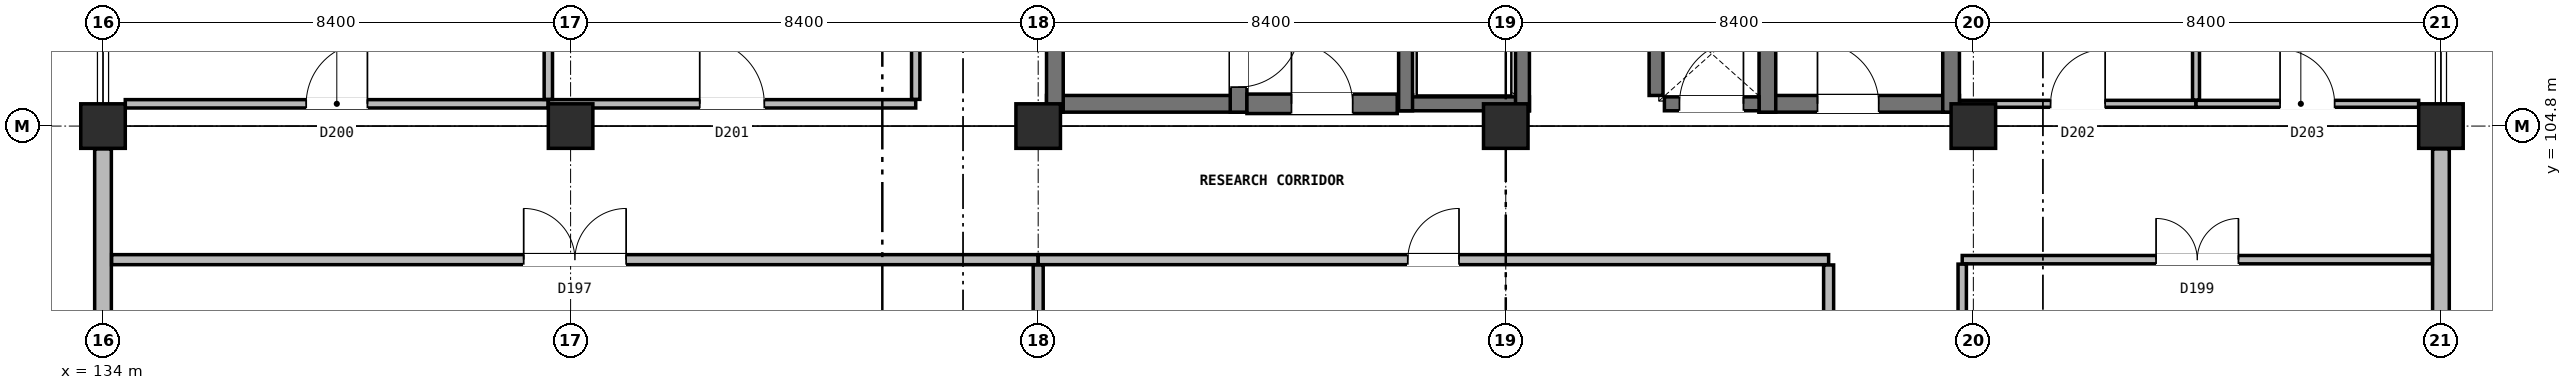
"""IFC4 building model, lengths in metres.
Left out: names, types, materials, properties, quantities, classifications, styles, units other than length and angle.
Written with IfcOpenShell. Run it as: python <this file> out.ifc"""

import sys

from ifc_helpers import new_model, si_unit, direction, frame, frame_2d, origin, origin_2d, place, context, subcontext, project, spatial, rectangle, extrude, element, fill, save


model = new_model("IFC4")
c1 = context("Model", 3, precision=1e-05, world=origin(), true_north=direction((0.0, 1.0)))
c2 = subcontext(c1, "Body", "Model", "MODEL_VIEW")
j1 = project(units=[si_unit("LENGTHUNIT", "METRE"), si_unit("PLANEANGLEUNIT", "RADIAN")], contexts=[c1])
p1 = place(None, origin())
s1 = spatial("IfcSite", under=j1, at=p1, CompositionType="ELEMENT")
p2 = place(p1, origin())
s2 = spatial("IfcBuilding", under=s1, at=p2, CompositionType="ELEMENT")
p3 = place(p2, frame((0.0, 0.0, 17.2)))
s3 = spatial("IfcBuildingStorey", under=s2, at=p3, CompositionType="ELEMENT", Elevation=17.2)
for number, where, z_axis, x_axis in (
    (1, (134.0, 104.8, 0.0), (0.0, 0.0, 1.0), (1.0, 0.0, 0.0)),
    (2, (142.4, 104.8, 0.0), (0.0, 0.0, 1.0), (1.0, 0.0, 0.0)),
    (3, (150.8, 104.8, 0.0), (0.0, 0.0, 1.0), (1.0, 0.0, 0.0)),
    (4, (159.2, 104.8, 0.0), (0.0, 0.0, 1.0), (1.0, 0.0, 0.0)),
    (5, (167.6, 104.8, 0.0), (0.0, 0.0, 1.0), (1.0, 0.0, 0.0)),
    (6, (176.0, 104.8, 0.0), (0.0, 0.0, 1.0), (1.0, 0.0, 0.0)),
):
    element("IfcColumn", number, at=place(p3, frame(where, z_axis=z_axis, x_axis=x_axis)), inside=s3, PredefinedType="COLUMN", context=c2, shape_type="SweptSolid", body=[
        extrude(rectangle(XDim=0.8, YDim=0.8, at=origin_2d()), origin(), (0.0, 0.0, 1.0), 3.8),
    ])
p4 = place(p3, frame((176.0, 96.41, 0.0), z_axis=(0.0, 0.0, 1.0), x_axis=(0.0, 1.0, 0.0)))
e7 = element("IfcWall", 7, at=p4, inside=s3, PredefinedType="SOLIDWALL", context=c2, shape_type="SweptSolid", body=[
    extrude(rectangle(XDim=7.98, YDim=0.3, at=frame_2d((3.99, 0.0))), origin(), (0.0, 0.0, 1.0), 3.05),
])
p5 = place(p4, frame((1.695, 0.0, 0.9)))
e8 = element("IfcOpeningElement", 8, at=p5, cuts=e7, PredefinedType="OPENING", context=c2, shape_type="SweptSolid", body=[
    extrude(rectangle(XDim=2.6, YDim=2.0, at=frame_2d((1.3, 1.0))), frame((0.0, 0.16, 0.0), z_axis=(0.0, -1.0, 0.0), x_axis=(1.0, 0.0, 0.0)), (0.0, 0.0, 1.0), 0.32),
])
p6 = place(p3, frame((134.0, 104.39, 0.0), z_axis=(0.0, 0.0, 1.0), x_axis=(0.0, -1.0, 0.0)))
e9 = element("IfcWall", 9, at=p6, inside=s3, PredefinedType="SOLIDWALL", context=c2, shape_type="SweptSolid", body=[
    extrude(rectangle(XDim=7.98, YDim=0.3, at=frame_2d((3.99, 0.0))), origin(), (0.0, 0.0, 1.0), 3.05),
])
p7 = place(p6, frame((3.685, 0.0, 0.9)))
e10 = element("IfcOpeningElement", 10, at=p7, cuts=e9, PredefinedType="OPENING", context=c2, shape_type="SweptSolid", body=[
    extrude(rectangle(XDim=2.6, YDim=2.0, at=frame_2d((1.3, 1.0))), frame((0.0, 0.16, 0.0), z_axis=(0.0, -1.0, 0.0), x_axis=(1.0, 0.0, 0.0)), (0.0, 0.0, 1.0), 0.32),
])
p8 = place(p3, frame((150.95, 105.2, 0.0), z_axis=(0.0, 0.0, 1.0), x_axis=(1.0, 0.0, 0.0)))
e11 = element("IfcWall", 11, at=p8, inside=s3, PredefinedType="SHEAR", context=c2, shape_type="SweptSolid", body=[
    extrude(rectangle(XDim=3.6, YDim=0.3, at=frame_2d((1.8, 0.0))), origin(), (0.0, 0.0, 1.0), 3.8),
])
p9 = place(p3, frame((151.1, 105.05, 0.0), z_axis=(0.0, 0.0, 1.0), x_axis=(0.0, 1.0, 0.0)))
e12 = element("IfcWall", 12, at=p9, inside=s3, PredefinedType="SHEAR", context=c2, shape_type="SweptSolid", body=[
    extrude(rectangle(XDim=8.3, YDim=0.3, at=frame_2d((4.15, 0.0))), origin(), (0.0, 0.0, 1.0), 3.8),
])
p10 = place(p3, frame((154.4, 105.05, 0.0), z_axis=(0.0, 0.0, 1.0), x_axis=(0.0, 1.0, 0.0)))
e13 = element("IfcWall", 13, at=p10, inside=s3, PredefinedType="SHEAR", context=c2, shape_type="SweptSolid", body=[
    extrude(rectangle(XDim=8.3, YDim=0.3, at=frame_2d((4.15, 0.0))), origin(), (0.0, 0.0, 1.0), 3.8),
])
p11 = place(p10, frame((0.45, 0.0, 0.0)))
e14 = element("IfcOpeningElement", 14, at=p11, cuts=e13, PredefinedType="OPENING", context=c2, shape_type="SweptSolid", body=[
    extrude(rectangle(XDim=1.1, YDim=2.2, at=frame_2d((0.55, 1.1))), frame((0.0, 0.16, 0.0), z_axis=(0.0, -1.0, 0.0), x_axis=(1.0, 0.0, 0.0)), (0.0, 0.0, 1.0), 0.32),
])
p12 = place(p3, frame((163.75, 105.2, 0.0), z_axis=(0.0, 0.0, 1.0), x_axis=(1.0, 0.0, 0.0)))
e15 = element("IfcWall", 15, at=p12, inside=s3, PredefinedType="SHEAR", context=c2, shape_type="SweptSolid", body=[
    extrude(rectangle(XDim=3.6, YDim=0.3, at=frame_2d((1.8, 0.0))), origin(), (0.0, 0.0, 1.0), 3.8),
])
p13 = place(p12, frame((1.05, 0.0, 0.0)))
e16 = element("IfcOpeningElement", 16, at=p13, cuts=e15, PredefinedType="OPENING", context=c2, shape_type="SweptSolid", body=[
    extrude(rectangle(XDim=1.1, YDim=2.2, at=frame_2d((0.55, 1.1))), frame((0.0, 0.16, 0.0), z_axis=(0.0, -1.0, 0.0), x_axis=(1.0, 0.0, 0.0)), (0.0, 0.0, 1.0), 0.32),
])
for number, where, z_axis, x_axis in (
    (17, (163.9, 105.05, 0.0), (0.0, 0.0, 1.0), (0.0, 1.0, 0.0)),
    (18, (167.2, 105.05, 0.0), (0.0, 0.0, 1.0), (0.0, 1.0, 0.0)),
):
    element("IfcWall", number, at=place(p3, frame(where, z_axis=z_axis, x_axis=x_axis)), inside=s3, PredefinedType="SHEAR", context=c2, shape_type="SweptSolid", body=[
        extrude(rectangle(XDim=8.3, YDim=0.3, at=frame_2d((4.15, 0.0))), origin(), (0.0, 0.0, 1.0), 3.8),
    ])
p14 = place(p3, frame((157.275, 105.2, 0.0), z_axis=(0.0, 0.0, 1.0), x_axis=(1.0, 0.0, 0.0)))
e19 = element("IfcWall", 19, at=p14, inside=s3, PredefinedType="SOLIDWALL", context=c2, shape_type="SweptSolid", body=[
    extrude(rectangle(XDim=2.35, YDim=0.25, at=frame_2d((1.175, 0.0))), origin(), (0.0, 0.0, 1.0), 3.48),
])
for number, where, z_axis, x_axis in (
    (20, (157.4, 105.075, 0.0), (0.0, 0.0, 1.0), (0.0, 1.0, 0.0)),
    (21, (159.5, 105.075, 0.0), (0.0, 0.0, 1.0), (0.0, 1.0, 0.0)),
):
    element("IfcWall", number, at=place(p3, frame(where, z_axis=z_axis, x_axis=x_axis)), inside=s3, PredefinedType="SOLIDWALL", context=c2, shape_type="SweptSolid", body=[
        extrude(rectangle(XDim=2.65, YDim=0.25, at=frame_2d((1.325, 0.0))), origin(), (0.0, 0.0, 1.0), 3.48),
    ])
p15 = place(p3, frame((154.55, 105.2, 0.0), z_axis=(0.0, 0.0, 1.0), x_axis=(1.0, 0.0, 0.0)))
e22 = element("IfcWall", 22, at=p15, inside=s3, PredefinedType="SHEAR", context=c2, shape_type="SweptSolid", body=[
    extrude(rectangle(XDim=2.7, YDim=0.35, at=frame_2d((1.35, 0.0))), origin(), (0.0, 0.0, 1.0), 3.48),
])
p16 = place(p15, frame((0.8, 0.0, 0.0)))
e23 = element("IfcOpeningElement", 23, at=p16, cuts=e22, PredefinedType="OPENING", context=c2, shape_type="SweptSolid", body=[
    extrude(rectangle(XDim=1.1, YDim=2.2, at=frame_2d((0.55, 1.1))), frame((0.0, 0.185, 0.0), z_axis=(0.0, -1.0, 0.0), x_axis=(1.0, 0.0, 0.0)), (0.0, 0.0, 1.0), 0.37),
])
p17 = place(p3, frame((161.9, 105.35, 0.0), z_axis=(0.0, 0.0, 1.0), x_axis=(0.0, 1.0, 0.0)))
e24 = element("IfcWall", 24, at=p17, inside=s3, PredefinedType="SOLIDWALL", context=c2, shape_type="SweptSolid", body=[
    extrude(rectangle(XDim=1.5, YDim=0.25, at=frame_2d((0.75, 0.0))), origin(), (0.0, 0.0, 1.0), 3.48),
])
p18 = place(p3, frame((162.05, 105.2, 0.0), z_axis=(0.0, 0.0, 1.0), x_axis=(1.0, 0.0, 0.0)))
e25 = element("IfcWall", 25, at=p18, inside=s3, PredefinedType="SOLIDWALL", context=c2, shape_type="SweptSolid", body=[
    extrude(rectangle(XDim=1.7, YDim=0.25, at=frame_2d((0.85, 0.0))), origin(), (0.0, 0.0, 1.0), 3.48),
])
p19 = place(p18, frame((0.27, 0.0, 0.0)))
e26 = element("IfcOpeningElement", 26, at=p19, cuts=e25, PredefinedType="OPENING", context=c2, shape_type="SweptSolid", body=[
    extrude(rectangle(XDim=1.15, YDim=2.2, at=frame_2d((0.575, 1.1))), frame((0.0, 0.135, 0.0), z_axis=(0.0, -1.0, 0.0), x_axis=(1.0, 0.0, 0.0)), (0.0, 0.0, 1.0), 0.27),
])
p20 = place(p3, frame((134.155, 102.4, 0.0), z_axis=(0.0, 0.0, 1.0), x_axis=(1.0, 0.0, 0.0)))
e27 = element("IfcWall", 27, at=p20, inside=s3, PredefinedType="PARTITIONING", context=c2, shape_type="SweptSolid", body=[
    extrude(rectangle(XDim=16.645, YDim=0.18, at=frame_2d((8.323, 0.0))), origin(), (0.0, 0.0, 1.0), 3.465),
])
p21 = place(p20, frame((7.403, 0.0, 0.0)))
e28 = element("IfcOpeningElement", 28, at=p21, cuts=e27, PredefinedType="OPENING", context=c2, shape_type="SweptSolid", body=[
    extrude(rectangle(XDim=1.84, YDim=2.38, at=frame_2d((0.92, 1.19))), frame((0.0, 0.1, 0.0), z_axis=(0.0, -1.0, 0.0), x_axis=(1.0, 0.0, 0.0)), (0.0, 0.0, 1.0), 0.2),
])
p22 = place(p3, frame((150.8, 102.4, 0.0), z_axis=(0.0, 0.0, 1.0), x_axis=(1.0, 0.0, 0.0)))
e29 = element("IfcWall", 29, at=p22, inside=s3, PredefinedType="PARTITIONING", context=c2, shape_type="SweptSolid", body=[
    extrude(rectangle(XDim=14.2, YDim=0.18, at=frame_2d((7.1, 0.0))), origin(), (0.0, 0.0, 1.0), 3.465),
])
p23 = place(p22, frame((6.64, 0.0, 0.0)))
e30 = element("IfcOpeningElement", 30, at=p23, cuts=e29, PredefinedType="OPENING", context=c2, shape_type="SweptSolid", body=[
    extrude(rectangle(XDim=0.92, YDim=2.1, at=frame_2d((0.46, 1.05))), frame((0.0, 0.1, 0.0), z_axis=(0.0, -1.0, 0.0), x_axis=(1.0, 0.0, 0.0)), (0.0, 0.0, 1.0), 0.2),
])
p24 = place(p3, frame((167.4, 102.4, 0.0), z_axis=(0.0, 0.0, 1.0), x_axis=(1.0, 0.0, 0.0)))
e31 = element("IfcWall", 31, at=p24, inside=s3, PredefinedType="PARTITIONING", context=c2, shape_type="SweptSolid", body=[
    extrude(rectangle(XDim=8.445, YDim=0.15, at=frame_2d((4.223, 0.0))), origin(), (0.0, 0.0, 1.0), 3.465),
])
p25 = place(p24, frame((3.482, 0.0, 0.0)))
e32 = element("IfcOpeningElement", 32, at=p25, cuts=e31, PredefinedType="OPENING", context=c2, shape_type="SweptSolid", body=[
    extrude(rectangle(XDim=1.48, YDim=2.2, at=frame_2d((0.74, 1.1))), frame((0.0, 0.085, 0.0), z_axis=(0.0, -1.0, 0.0), x_axis=(1.0, 0.0, 0.0)), (0.0, 0.0, 1.0), 0.17),
])
p26 = place(p3, frame((134.4, 105.2, 0.0), z_axis=(0.0, 0.0, 1.0), x_axis=(1.0, 0.0, 0.0)))
e33 = element("IfcWall", 33, at=p26, inside=s3, PredefinedType="PARTITIONING", context=c2, shape_type="SweptSolid", body=[
    extrude(rectangle(XDim=7.6, YDim=0.15, at=frame_2d((3.8, 0.0))), origin(), (0.0, 0.0, 1.0), 3.045),
])
p27 = place(p26, frame((3.25, 0.0, 0.0)))
e34 = element("IfcOpeningElement", 34, at=p27, cuts=e33, PredefinedType="OPENING", context=c2, shape_type="SweptSolid", body=[
    extrude(rectangle(XDim=1.1, YDim=2.15, at=frame_2d((0.55, 1.075))), frame((0.0, 0.085, 0.0), z_axis=(0.0, -1.0, 0.0), x_axis=(1.0, 0.0, 0.0)), (0.0, 0.0, 1.0), 0.17),
])
p28 = place(p3, frame((142.0, 105.2, 0.0), z_axis=(0.0, 0.0, 1.0), x_axis=(1.0, 0.0, 0.0)))
e35 = element("IfcWall", 35, at=p28, inside=s3, PredefinedType="PARTITIONING", context=c2, shape_type="SweptSolid", body=[
    extrude(rectangle(XDim=6.6, YDim=0.15, at=frame_2d((3.3, 0.0))), origin(), (0.0, 0.0, 1.0), 3.045),
])
p29 = place(p28, frame((2.72, 0.0, 0.0)))
e36 = element("IfcOpeningElement", 36, at=p29, cuts=e35, PredefinedType="OPENING", context=c2, shape_type="SweptSolid", body=[
    extrude(rectangle(XDim=1.16, YDim=2.2, at=frame_2d((0.58, 1.1))), frame((0.0, 0.085, 0.0), z_axis=(0.0, -1.0, 0.0), x_axis=(1.0, 0.0, 0.0)), (0.0, 0.0, 1.0), 0.17),
])
p30 = place(p3, frame((167.355, 105.2, 0.0), z_axis=(0.0, 0.0, 1.0), x_axis=(1.0, 0.0, 0.0)))
e37 = element("IfcWall", 37, at=p30, inside=s3, PredefinedType="PARTITIONING", context=c2, shape_type="SweptSolid", body=[
    extrude(rectangle(XDim=4.245, YDim=0.125, at=frame_2d((2.123, 0.0))), origin(), (0.0, 0.0, 1.0), 3.045),
])
p31 = place(p30, frame((1.633, 0.0, 0.0)))
e38 = element("IfcOpeningElement", 38, at=p31, cuts=e37, PredefinedType="OPENING", context=c2, shape_type="SweptSolid", body=[
    extrude(rectangle(XDim=0.98, YDim=2.1, at=frame_2d((0.49, 1.05))), frame((0.0, 0.073, 0.0), z_axis=(0.0, -1.0, 0.0), x_axis=(1.0, 0.0, 0.0)), (0.0, 0.0, 1.0), 0.145),
])
p32 = place(p3, frame((171.6, 105.2, 0.0), z_axis=(0.0, 0.0, 1.0), x_axis=(1.0, 0.0, 0.0)))
e39 = element("IfcWall", 39, at=p32, inside=s3, PredefinedType="PARTITIONING", context=c2, shape_type="SweptSolid", body=[
    extrude(rectangle(XDim=4.0, YDim=0.125, at=frame_2d((2.0, 0.0))), origin(), (0.0, 0.0, 1.0), 3.045),
])
p33 = place(p32, frame((1.51, 0.0, 0.0)))
e40 = element("IfcOpeningElement", 40, at=p33, cuts=e39, PredefinedType="OPENING", context=c2, shape_type="SweptSolid", body=[
    extrude(rectangle(XDim=0.98, YDim=2.1, at=frame_2d((0.49, 1.05))), frame((0.0, 0.073, 0.0), z_axis=(0.0, -1.0, 0.0), x_axis=(1.0, 0.0, 0.0)), (0.0, 0.0, 1.0), 0.145),
])
p34 = place(p3, frame((165.0, 88.0, 0.0), z_axis=(0.0, 0.0, 1.0), x_axis=(0.0, 1.0, 0.0)))
e41 = element("IfcWall", 41, at=p34, inside=s3, PredefinedType="PARTITIONING", context=c2, shape_type="SweptSolid", body=[
    extrude(rectangle(XDim=14.305, YDim=0.18, at=frame_2d((7.152, 0.0))), origin(), (0.0, 0.0, 1.0), 3.465),
])
p35 = place(p3, frame((167.4, 88.0, 0.0), z_axis=(0.0, 0.0, 1.0), x_axis=(0.0, 1.0, 0.0)))
e42 = element("IfcWall", 42, at=p35, inside=s3, PredefinedType="PARTITIONING", context=c2, shape_type="SweptSolid", body=[
    extrude(rectangle(XDim=14.32, YDim=0.15, at=frame_2d((7.16, 0.0))), origin(), (0.0, 0.0, 1.0), 3.045),
])
p36 = place(p3, frame((148.6, 105.28, 0.0), z_axis=(0.0, 0.0, 1.0), x_axis=(0.0, 1.0, 0.0)))
e43 = element("IfcWall", 43, at=p36, inside=s3, PredefinedType="PARTITIONING", context=c2, shape_type="SweptSolid", body=[
    extrude(rectangle(XDim=14.12, YDim=0.15, at=frame_2d((7.06, 0.0))), origin(), (0.0, 0.0, 1.0), 3.465),
])
p37 = place(p3, frame((150.8, 78.8, 0.0), z_axis=(0.0, 0.0, 1.0), x_axis=(0.0, 1.0, 0.0)))
e44 = element("IfcWall", 44, at=p37, inside=s3, PredefinedType="PARTITIONING", context=c2, shape_type="SweptSolid", body=[
    extrude(rectangle(XDim=23.505, YDim=0.18, at=frame_2d((11.752, 0.0))), origin(), (0.0, 0.0, 1.0), 3.045),
])
p38 = place(p3, frame((142.0, 105.28, 0.0), z_axis=(0.0, 0.0, 1.0), x_axis=(0.0, 1.0, 0.0)))
e45 = element("IfcWall", 45, at=p38, inside=s3, PredefinedType="PARTITIONING", context=c2, shape_type="SweptSolid", body=[
    extrude(rectangle(XDim=16.72, YDim=0.15, at=frame_2d((8.36, 0.0))), origin(), (0.0, 0.0, 1.0), 3.045),
])
p39 = place(p3, frame((171.6, 105.268, 0.0), z_axis=(0.0, 0.0, 1.0), x_axis=(0.0, 1.0, 0.0)))
e46 = element("IfcWall", 46, at=p39, inside=s3, PredefinedType="PARTITIONING", context=c2, shape_type="SweptSolid", body=[
    extrude(rectangle(XDim=16.978, YDim=0.125, at=frame_2d((8.489, 0.0))), origin(), (0.0, 0.0, 1.0), 3.465),
])
p40 = place(p11, frame((1.1, 0.0, 0.0), z_axis=(0.0, 0.0, 1.0), x_axis=(-1.0, 0.0, 0.0)))
e47 = element("IfcDoor", 47, at=p40, inside=s3, OperationType="SINGLE_SWING_RIGHT", PredefinedType="DOOR", context=c2, shape_type="SweptSolid", body=[
    extrude(rectangle(XDim=1.1, YDim=2.2, at=frame_2d((0.55, 1.1))), frame((0.0, 0.025, 0.0), z_axis=(0.0, -1.0, 0.0), x_axis=(1.0, 0.0, 0.0)), (0.0, 0.0, 1.0), 0.05),
])
fill(e14, e47)
p41 = place(p13, origin())
e48 = element("IfcDoor", 48, at=p41, inside=s3, OperationType="SINGLE_SWING_LEFT", PredefinedType="DOOR", context=c2, shape_type="SweptSolid", body=[
    extrude(rectangle(XDim=1.1, YDim=2.2, at=frame_2d((0.55, 1.1))), frame((0.0, 0.025, 0.0), z_axis=(0.0, -1.0, 0.0), x_axis=(1.0, 0.0, 0.0)), (0.0, 0.0, 1.0), 0.05),
])
fill(e16, e48)
p42 = place(p16, origin())
e49 = element("IfcDoor", 49, at=p42, inside=s3, OperationType="SINGLE_SWING_LEFT", PredefinedType="DOOR", context=c2, shape_type="SweptSolid", body=[
    extrude(rectangle(XDim=1.1, YDim=2.2, at=frame_2d((0.55, 1.1))), frame((0.0, 0.025, 0.0), z_axis=(0.0, -1.0, 0.0), x_axis=(1.0, 0.0, 0.0)), (0.0, 0.0, 1.0), 0.05),
])
fill(e23, e49)
p43 = place(p19, origin())
e50 = element("IfcDoor", 50, at=p43, inside=s3, OperationType="SINGLE_SWING_RIGHT", PredefinedType="DOOR", context=c2, shape_type="SweptSolid", body=[
    extrude(rectangle(XDim=1.15, YDim=2.2, at=frame_2d((0.575, 1.1))), frame((0.0, 0.025, 0.0), z_axis=(0.0, -1.0, 0.0), x_axis=(1.0, 0.0, 0.0)), (0.0, 0.0, 1.0), 0.05),
])
fill(e26, e50)
p44 = place(p21, origin())
e51 = element("IfcDoor", 51, at=p44, inside=s3, OperationType="DOUBLE_DOOR_SINGLE_SWING", PredefinedType="DOOR", context=c2, shape_type="SweptSolid", body=[
    extrude(rectangle(XDim=1.84, YDim=2.38, at=frame_2d((0.92, 1.19))), frame((0.0, 0.025, 0.0), z_axis=(0.0, -1.0, 0.0), x_axis=(1.0, 0.0, 0.0)), (0.0, 0.0, 1.0), 0.05),
])
fill(e28, e51)
p45 = place(p23, origin())
e52 = element("IfcDoor", 52, at=p45, inside=s3, OperationType="SINGLE_SWING_RIGHT", PredefinedType="DOOR", context=c2, shape_type="SweptSolid", body=[
    extrude(rectangle(XDim=0.92, YDim=2.1, at=frame_2d((0.46, 1.05))), frame((0.0, 0.025, 0.0), z_axis=(0.0, -1.0, 0.0), x_axis=(1.0, 0.0, 0.0)), (0.0, 0.0, 1.0), 0.05),
])
fill(e30, e52)
p46 = place(p25, origin())
e53 = element("IfcDoor", 53, at=p46, inside=s3, OperationType="DOUBLE_DOOR_SINGLE_SWING", PredefinedType="DOOR", context=c2, shape_type="SweptSolid", body=[
    extrude(rectangle(XDim=1.48, YDim=2.2, at=frame_2d((0.74, 1.1))), frame((0.0, 0.025, 0.0), z_axis=(0.0, -1.0, 0.0), x_axis=(1.0, 0.0, 0.0)), (0.0, 0.0, 1.0), 0.05),
])
fill(e32, e53)
p47 = place(p27, origin())
e54 = element("IfcDoor", 54, at=p47, inside=s3, OperationType="SINGLE_SWING_RIGHT", PredefinedType="DOOR", context=c2, shape_type="SweptSolid", body=[
    extrude(rectangle(XDim=1.1, YDim=2.15, at=frame_2d((0.55, 1.075))), frame((0.0, 0.025, 0.0), z_axis=(0.0, -1.0, 0.0), x_axis=(1.0, 0.0, 0.0)), (0.0, 0.0, 1.0), 0.05),
])
fill(e34, e54)
p48 = place(p29, origin())
e55 = element("IfcDoor", 55, at=p48, inside=s3, OperationType="SINGLE_SWING_LEFT", PredefinedType="DOOR", context=c2, shape_type="SweptSolid", body=[
    extrude(rectangle(XDim=1.16, YDim=2.2, at=frame_2d((0.58, 1.1))), frame((0.0, 0.025, 0.0), z_axis=(0.0, -1.0, 0.0), x_axis=(1.0, 0.0, 0.0)), (0.0, 0.0, 1.0), 0.05),
])
fill(e36, e55)
p49 = place(p31, origin())
e56 = element("IfcDoor", 56, at=p49, inside=s3, OperationType="SINGLE_SWING_RIGHT", PredefinedType="DOOR", context=c2, shape_type="SweptSolid", body=[
    extrude(rectangle(XDim=0.98, YDim=2.1, at=frame_2d((0.49, 1.05))), frame((0.0, 0.025, 0.0), z_axis=(0.0, -1.0, 0.0), x_axis=(1.0, 0.0, 0.0)), (0.0, 0.0, 1.0), 0.05),
])
fill(e38, e56)
p50 = place(p33, origin())
e57 = element("IfcDoor", 57, at=p50, inside=s3, OperationType="SINGLE_SWING_LEFT", PredefinedType="DOOR", context=c2, shape_type="SweptSolid", body=[
    extrude(rectangle(XDim=0.98, YDim=2.1, at=frame_2d((0.49, 1.05))), frame((0.0, 0.025, 0.0), z_axis=(0.0, -1.0, 0.0), x_axis=(1.0, 0.0, 0.0)), (0.0, 0.0, 1.0), 0.05),
])
fill(e40, e57)
save(model, sys.argv[1])
